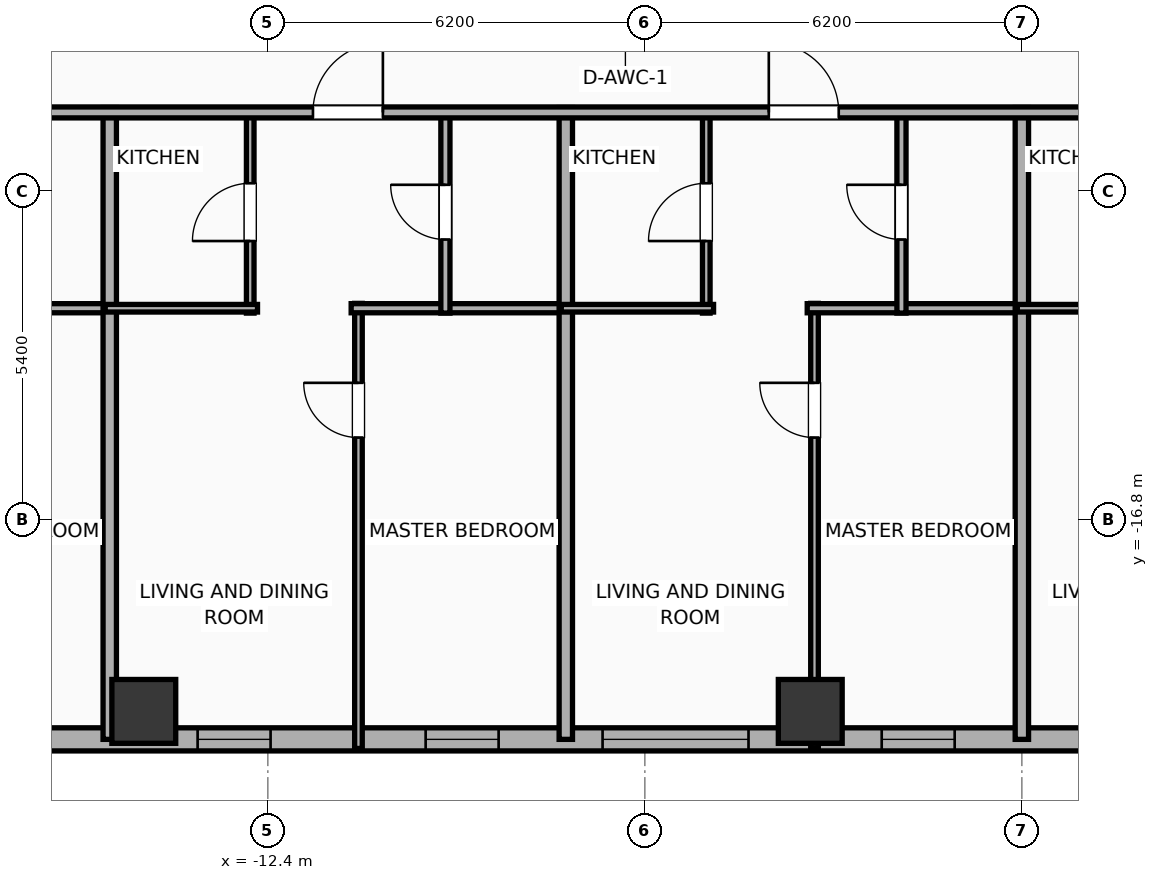
"""IFC4 building model, lengths in metres.
Left out: names, types, materials, properties, quantities, classifications, styles, units other than length and angle.
Written with IfcOpenShell. Run it as: python <this file> out.ifc"""

import sys

from ifc_helpers import new_model, si_unit, direction, frame, frame_2d, origin, origin_2d, place, context, subcontext, project, spatial, rectangle, hollow_rectangle, extrude, element, fill, save


model = new_model("IFC4")
c1 = context("Model", 3, precision=1e-05, world=origin(), true_north=direction((0.0, 1.0)))
c2 = subcontext(c1, "Body", "Model", "MODEL_VIEW")
j1 = project(units=[si_unit("LENGTHUNIT", "METRE"), si_unit("PLANEANGLEUNIT", "RADIAN")], contexts=[c1])
p1 = place(None, origin())
s1 = spatial("IfcSite", under=j1, at=p1, CompositionType="ELEMENT")
p2 = place(p1, origin())
s2 = spatial("IfcBuilding", under=s1, at=p2, CompositionType="ELEMENT")
p3 = place(p2, frame((0.0, 0.0, 136.5)))
s3 = spatial("IfcBuildingStorey", under=s2, at=p3, CompositionType="ELEMENT", Elevation=136.5)
for number, where, z_axis, x_axis in (
    (1, (-14.44, -19.95, 0.0), (0.0, 0.0, 1.0), (1.0, 0.0, 0.0)),
    (2, (-3.48, -19.95, 0.0), (0.0, 0.0, 1.0), (1.0, 0.0, 0.0)),
):
    element("IfcColumn", number, at=place(p3, frame(where, z_axis=z_axis, x_axis=x_axis)), inside=s3, PredefinedType="COLUMN", context=c2, shape_type="SweptSolid", body=[
        extrude(hollow_rectangle(XDim=1.05, YDim=1.05, WallThickness=0.036, at=origin_2d()), origin(), (0.0, 0.0, 1.0), 3.865),
    ])
p4 = place(p3, frame((29.381, -20.41, 0.0), z_axis=(0.0, 0.0, 1.0), x_axis=(-1.0, 0.0, 0.0)))
e3 = element("IfcWall", 3, at=p4, inside=s3, PredefinedType="ELEMENTEDWALL", context=c2, shape_type="SweptSolid", body=[
    extrude(rectangle(XDim=54.763, YDim=0.38, at=frame_2d((27.381, 0.0))), origin(), (0.0, 0.0, 1.0), 2.39),
])
p5 = place(p4, frame((7.295, 0.0, 0.75)))
e4 = element("IfcOpeningElement", 4, at=p5, cuts=e3, PredefinedType="OPENING", context=c2, shape_type="SweptSolid", body=[
    extrude(rectangle(XDim=2.4, YDim=1.45, at=frame_2d((1.2, 0.725))), frame((0.0, 0.2, 0.0), z_axis=(0.0, -1.0, 0.0), x_axis=(1.0, 0.0, 0.0)), (0.0, 0.0, 1.0), 0.4),
])
p6 = place(p4, frame((18.486, 0.0, 0.75)))
e5 = element("IfcOpeningElement", 5, at=p6, cuts=e3, PredefinedType="OPENING", context=c2, shape_type="SweptSolid", body=[
    extrude(rectangle(XDim=2.4, YDim=1.45, at=frame_2d((1.2, 0.725))), frame((0.0, 0.2, 0.0), z_axis=(0.0, -1.0, 0.0), x_axis=(1.0, 0.0, 0.0)), (0.0, 0.0, 1.0), 0.4),
])
p7 = place(p4, frame((33.877, 0.0, 0.75)))
e6 = element("IfcOpeningElement", 6, at=p7, cuts=e3, PredefinedType="OPENING", context=c2, shape_type="SweptSolid", body=[
    extrude(rectangle(XDim=2.4, YDim=1.45, at=frame_2d((1.2, 0.725))), frame((0.0, 0.2, 0.0), z_axis=(0.0, -1.0, 0.0), x_axis=(1.0, 0.0, 0.0)), (0.0, 0.0, 1.0), 0.4),
])
p8 = place(p4, frame((48.367, 0.0, 0.75)))
e7 = element("IfcOpeningElement", 7, at=p8, cuts=e3, PredefinedType="OPENING", context=c2, shape_type="SweptSolid", body=[
    extrude(rectangle(XDim=2.4, YDim=1.45, at=frame_2d((1.2, 0.725))), frame((0.0, 0.2, 0.0), z_axis=(0.0, -1.0, 0.0), x_axis=(1.0, 0.0, 0.0)), (0.0, 0.0, 1.0), 0.4),
])
p9 = place(p4, frame((52.277, 0.0, 0.55)))
e8 = element("IfcOpeningElement", 8, at=p9, cuts=e3, PredefinedType="OPENING", context=c2, shape_type="SweptSolid", body=[
    extrude(rectangle(XDim=1.2, YDim=1.15, at=frame_2d((0.6, 0.575))), frame((0.0, 0.2, 0.0), z_axis=(0.0, -1.0, 0.0), x_axis=(1.0, 0.0, 0.0)), (0.0, 0.0, 1.0), 0.4),
])
p10 = place(p4, frame((45.486, 0.0, 0.55)))
e9 = element("IfcOpeningElement", 9, at=p10, cuts=e3, PredefinedType="OPENING", context=c2, shape_type="SweptSolid", body=[
    extrude(rectangle(XDim=1.2, YDim=1.15, at=frame_2d((0.6, 0.575))), frame((0.0, 0.2, 0.0), z_axis=(0.0, -1.0, 0.0), x_axis=(1.0, 0.0, 0.0)), (0.0, 0.0, 1.0), 0.4),
])
p11 = place(p4, frame((41.736, 0.0, 0.55)))
e10 = element("IfcOpeningElement", 10, at=p11, cuts=e3, PredefinedType="OPENING", context=c2, shape_type="SweptSolid", body=[
    extrude(rectangle(XDim=1.2, YDim=1.15, at=frame_2d((0.6, 0.575))), frame((0.0, 0.2, 0.0), z_axis=(0.0, -1.0, 0.0), x_axis=(1.0, 0.0, 0.0)), (0.0, 0.0, 1.0), 0.4),
])
p12 = place(p4, frame((37.986, 0.0, 0.55)))
e11 = element("IfcOpeningElement", 11, at=p12, cuts=e3, PredefinedType="OPENING", context=c2, shape_type="SweptSolid", body=[
    extrude(rectangle(XDim=1.2, YDim=1.15, at=frame_2d((0.6, 0.575))), frame((0.0, 0.2, 0.0), z_axis=(0.0, -1.0, 0.0), x_axis=(1.0, 0.0, 0.0)), (0.0, 0.0, 1.0), 0.4),
])
p13 = place(p4, frame((30.486, 0.0, 0.55)))
e12 = element("IfcOpeningElement", 12, at=p13, cuts=e3, PredefinedType="OPENING", context=c2, shape_type="SweptSolid", body=[
    extrude(rectangle(XDim=1.2, YDim=1.15, at=frame_2d((0.6, 0.575))), frame((0.0, 0.2, 0.0), z_axis=(0.0, -1.0, 0.0), x_axis=(1.0, 0.0, 0.0)), (0.0, 0.0, 1.0), 0.4),
])
p14 = place(p4, frame((26.736, 0.0, 0.55)))
e13 = element("IfcOpeningElement", 13, at=p14, cuts=e3, PredefinedType="OPENING", context=c2, shape_type="SweptSolid", body=[
    extrude(rectangle(XDim=1.2, YDim=1.15, at=frame_2d((0.6, 0.575))), frame((0.0, 0.2, 0.0), z_axis=(0.0, -1.0, 0.0), x_axis=(1.0, 0.0, 0.0)), (0.0, 0.0, 1.0), 0.4),
])
p15 = place(p4, frame((22.986, 0.0, 0.55)))
e14 = element("IfcOpeningElement", 14, at=p15, cuts=e3, PredefinedType="OPENING", context=c2, shape_type="SweptSolid", body=[
    extrude(rectangle(XDim=1.2, YDim=1.15, at=frame_2d((0.6, 0.575))), frame((0.0, 0.2, 0.0), z_axis=(0.0, -1.0, 0.0), x_axis=(1.0, 0.0, 0.0)), (0.0, 0.0, 1.0), 0.4),
])
p16 = place(p4, frame((15.486, 0.0, 0.55)))
e15 = element("IfcOpeningElement", 15, at=p16, cuts=e3, PredefinedType="OPENING", context=c2, shape_type="SweptSolid", body=[
    extrude(rectangle(XDim=1.2, YDim=1.15, at=frame_2d((0.6, 0.575))), frame((0.0, 0.2, 0.0), z_axis=(0.0, -1.0, 0.0), x_axis=(1.0, 0.0, 0.0)), (0.0, 0.0, 1.0), 0.4),
])
p17 = place(p4, frame((11.736, 0.0, 0.55)))
e16 = element("IfcOpeningElement", 16, at=p17, cuts=e3, PredefinedType="OPENING", context=c2, shape_type="SweptSolid", body=[
    extrude(rectangle(XDim=1.2, YDim=1.15, at=frame_2d((0.6, 0.575))), frame((0.0, 0.2, 0.0), z_axis=(0.0, -1.0, 0.0), x_axis=(1.0, 0.0, 0.0)), (0.0, 0.0, 1.0), 0.4),
])
p18 = place(p4, frame((3.286, 0.0, 0.55)))
e17 = element("IfcOpeningElement", 17, at=p18, cuts=e3, PredefinedType="OPENING", context=c2, shape_type="SweptSolid", body=[
    extrude(rectangle(XDim=1.2, YDim=1.15, at=frame_2d((0.6, 0.575))), frame((0.0, 0.2, 0.0), z_axis=(0.0, -1.0, 0.0), x_axis=(1.0, 0.0, 0.0)), (0.0, 0.0, 1.0), 0.4),
])
p19 = place(p3, frame((-18.53, -13.32, 0.0), z_axis=(0.0, 0.0, 1.0), x_axis=(1.0, 0.0, 0.0)))
e18 = element("IfcWall", 18, at=p19, inside=s3, PredefinedType="PLUMBINGWALL", context=c2, shape_type="SweptSolid", body=[
    extrude(rectangle(XDim=3.605, YDim=0.15, at=frame_2d((1.802, 0.0))), origin(), (0.0, 0.0, 1.0), 3.5),
])
p20 = place(p3, frame((-15.0, -20.41, 0.0), z_axis=(0.0, 0.0, 1.0), x_axis=(0.0, 1.0, 0.0)))
e19 = element("IfcWall", 19, at=p20, inside=s3, PredefinedType="PARTITIONING", context=c2, shape_type="SweptSolid", body=[
    extrude(rectangle(XDim=10.39, YDim=0.22, at=frame_2d((5.195, 0.0))), origin(), (0.0, 0.0, 1.0), 2.39),
])
p21 = place(p3, frame((-10.91, -20.56, 0.0), z_axis=(0.0, 0.0, 1.0), x_axis=(0.0, 1.0, 0.0)))
e20 = element("IfcWall", 20, at=p21, inside=s3, PredefinedType="PARTITIONING", context=c2, shape_type="SweptSolid", body=[
    extrude(rectangle(XDim=7.32, YDim=0.125, at=frame_2d((3.66, 0.0))), origin(), (0.0, 0.0, 1.0), 3.5),
])
p22 = place(p21, frame((5.113, 0.0, 0.0)))
e21 = element("IfcOpeningElement", 21, at=p22, cuts=e20, PredefinedType="OPENING", context=c2, shape_type="SweptSolid", body=[
    extrude(rectangle(XDim=0.9, YDim=2.05, at=frame_2d((0.45, 1.025))), frame((0.0, 0.073, 0.0), z_axis=(0.0, -1.0, 0.0), x_axis=(1.0, 0.0, 0.0)), (0.0, 0.0, 1.0), 0.145),
])
p23 = place(p3, frame((-11.03, -13.32, 0.0), z_axis=(0.0, 0.0, 1.0), x_axis=(1.0, 0.0, 0.0)))
e22 = element("IfcWall", 22, at=p23, inside=s3, PredefinedType="PLUMBINGWALL", context=c2, shape_type="SweptSolid", body=[
    extrude(rectangle(XDim=3.605, YDim=0.15, at=frame_2d((1.802, 0.0))), origin(), (0.0, 0.0, 1.0), 3.5),
])
p24 = place(p3, frame((-12.69, -13.4, 0.0), z_axis=(0.0, 0.0, 1.0), x_axis=(0.0, 1.0, 0.0)))
e23 = element("IfcWall", 23, at=p24, inside=s3, PredefinedType="PARTITIONING", context=c2, shape_type="SweptSolid", body=[
    extrude(rectangle(XDim=3.32, YDim=0.125, at=frame_2d((1.66, 0.0))), origin(), (0.0, 0.0, 1.0), 3.5),
])
p25 = place(p24, frame((1.185, 0.0, 0.0)))
e24 = element("IfcOpeningElement", 24, at=p25, cuts=e23, PredefinedType="OPENING", context=c2, shape_type="SweptSolid", body=[
    extrude(rectangle(XDim=0.95, YDim=2.05, at=frame_2d((0.475, 1.025))), frame((0.0, 0.073, 0.0), z_axis=(0.0, -1.0, 0.0), x_axis=(1.0, 0.0, 0.0)), (0.0, 0.0, 1.0), 0.145),
])
p26 = place(p3, frame((-15.075, -13.32, 0.0), z_axis=(0.0, 0.0, 1.0), x_axis=(1.0, 0.0, 0.0)))
e25 = element("IfcWall", 25, at=p26, inside=s3, PredefinedType="PARTITIONING", context=c2, shape_type="SweptSolid", body=[
    extrude(rectangle(XDim=2.505, YDim=0.125, at=frame_2d((1.252, 0.0))), origin(), (0.0, 0.0, 1.0), 3.5),
])
p27 = place(p3, frame((-9.48, -13.4, 0.0), z_axis=(0.0, 0.0, 1.0), x_axis=(0.0, 1.0, 0.0)))
e26 = element("IfcWall", 26, at=p27, inside=s3, PredefinedType="PLUMBINGWALL", context=c2, shape_type="SweptSolid", body=[
    extrude(rectangle(XDim=3.32, YDim=0.15, at=frame_2d((1.66, 0.0))), origin(), (0.0, 0.0, 1.0), 3.5),
])
p28 = place(p27, frame((1.21, 0.0, 0.0)))
e27 = element("IfcOpeningElement", 27, at=p28, cuts=e26, PredefinedType="OPENING", context=c2, shape_type="SweptSolid", body=[
    extrude(rectangle(XDim=0.9, YDim=2.05, at=frame_2d((0.45, 1.025))), frame((0.0, 0.085, 0.0), z_axis=(0.0, -1.0, 0.0), x_axis=(1.0, 0.0, 0.0)), (0.0, 0.0, 1.0), 0.17),
])
p29 = place(p3, frame((-7.5, -20.41, 0.0), z_axis=(0.0, 0.0, 1.0), x_axis=(0.0, 1.0, 0.0)))
e28 = element("IfcWall", 28, at=p29, inside=s3, PredefinedType="PARTITIONING", context=c2, shape_type="SweptSolid", body=[
    extrude(rectangle(XDim=10.39, YDim=0.22, at=frame_2d((5.195, 0.0))), origin(), (0.0, 0.0, 1.0), 3.5),
])
p30 = place(p3, frame((-3.41, -20.56, 0.0), z_axis=(0.0, 0.0, 1.0), x_axis=(0.0, 1.0, 0.0)))
e29 = element("IfcWall", 29, at=p30, inside=s3, PredefinedType="PARTITIONING", context=c2, shape_type="SweptSolid", body=[
    extrude(rectangle(XDim=7.32, YDim=0.125, at=frame_2d((3.66, 0.0))), origin(), (0.0, 0.0, 1.0), 2.39),
])
p31 = place(p30, frame((5.113, 0.0, 0.0)))
e30 = element("IfcOpeningElement", 30, at=p31, cuts=e29, PredefinedType="OPENING", context=c2, shape_type="SweptSolid", body=[
    extrude(rectangle(XDim=0.9, YDim=2.05, at=frame_2d((0.45, 1.025))), frame((0.0, 0.073, 0.0), z_axis=(0.0, -1.0, 0.0), x_axis=(1.0, 0.0, 0.0)), (0.0, 0.0, 1.0), 0.145),
])
p32 = place(p3, frame((-3.53, -13.32, 0.0), z_axis=(0.0, 0.0, 1.0), x_axis=(1.0, 0.0, 0.0)))
e31 = element("IfcWall", 31, at=p32, inside=s3, PredefinedType="PLUMBINGWALL", context=c2, shape_type="SweptSolid", body=[
    extrude(rectangle(XDim=3.605, YDim=0.15, at=frame_2d((1.802, 0.0))), origin(), (0.0, 0.0, 1.0), 3.5),
])
p33 = place(p3, frame((-5.19, -13.4, 0.0), z_axis=(0.0, 0.0, 1.0), x_axis=(0.0, 1.0, 0.0)))
e32 = element("IfcWall", 32, at=p33, inside=s3, PredefinedType="PARTITIONING", context=c2, shape_type="SweptSolid", body=[
    extrude(rectangle(XDim=3.32, YDim=0.125, at=frame_2d((1.66, 0.0))), origin(), (0.0, 0.0, 1.0), 3.5),
])
p34 = place(p33, frame((1.185, 0.0, 0.0)))
e33 = element("IfcOpeningElement", 33, at=p34, cuts=e32, PredefinedType="OPENING", context=c2, shape_type="SweptSolid", body=[
    extrude(rectangle(XDim=0.95, YDim=2.05, at=frame_2d((0.475, 1.025))), frame((0.0, 0.073, 0.0), z_axis=(0.0, -1.0, 0.0), x_axis=(1.0, 0.0, 0.0)), (0.0, 0.0, 1.0), 0.145),
])
p35 = place(p3, frame((-7.575, -13.32, 0.0), z_axis=(0.0, 0.0, 1.0), x_axis=(1.0, 0.0, 0.0)))
e34 = element("IfcWall", 34, at=p35, inside=s3, PredefinedType="PARTITIONING", context=c2, shape_type="SweptSolid", body=[
    extrude(rectangle(XDim=2.505, YDim=0.125, at=frame_2d((1.252, 0.0))), origin(), (0.0, 0.0, 1.0), 3.5),
])
p36 = place(p3, frame((-1.98, -13.4, 0.0), z_axis=(0.0, 0.0, 1.0), x_axis=(0.0, 1.0, 0.0)))
e35 = element("IfcWall", 35, at=p36, inside=s3, PredefinedType="PLUMBINGWALL", context=c2, shape_type="SweptSolid", body=[
    extrude(rectangle(XDim=3.32, YDim=0.15, at=frame_2d((1.66, 0.0))), origin(), (0.0, 0.0, 1.0), 3.5),
])
p37 = place(p36, frame((1.21, 0.0, 0.0)))
e36 = element("IfcOpeningElement", 36, at=p37, cuts=e35, PredefinedType="OPENING", context=c2, shape_type="SweptSolid", body=[
    extrude(rectangle(XDim=0.9, YDim=2.05, at=frame_2d((0.45, 1.025))), frame((0.0, 0.085, 0.0), z_axis=(0.0, -1.0, 0.0), x_axis=(1.0, 0.0, 0.0)), (0.0, 0.0, 1.0), 0.17),
])
p38 = place(p3, frame((0.0, -20.41, 0.0), z_axis=(0.0, 0.0, 1.0), x_axis=(0.0, 1.0, 0.0)))
e37 = element("IfcWall", 37, at=p38, inside=s3, PredefinedType="PARTITIONING", context=c2, shape_type="SweptSolid", body=[
    extrude(rectangle(XDim=10.39, YDim=0.22, at=frame_2d((5.195, 0.0))), origin(), (0.0, 0.0, 1.0), 3.5),
])
p39 = place(p3, frame((-0.075, -13.32, 0.0), z_axis=(0.0, 0.0, 1.0), x_axis=(1.0, 0.0, 0.0)))
e38 = element("IfcWall", 38, at=p39, inside=s3, PredefinedType="PARTITIONING", context=c2, shape_type="SweptSolid", body=[
    extrude(rectangle(XDim=2.505, YDim=0.125, at=frame_2d((1.252, 0.0))), origin(), (0.0, 0.0, 1.0), 3.5),
])
p40 = place(p3, frame((-29.21, -10.1, 0.0), z_axis=(0.0, 0.0, 1.0), x_axis=(1.0, 0.0, 0.0)))
e39 = element("IfcWall", 39, at=p40, inside=s3, PredefinedType="PARTITIONING", context=c2, shape_type="SweptSolid", body=[
    extrude(rectangle(XDim=62.42, YDim=0.18, at=frame_2d((31.21, 0.0))), origin(), (0.0, 0.0, 1.0), 2.39),
])
p41 = place(p40, frame((3.002, 0.0, 0.0)))
e40 = element("IfcOpeningElement", 40, at=p41, cuts=e39, PredefinedType="OPENING", context=c2, shape_type="SweptSolid", body=[
    extrude(rectangle(XDim=0.9, YDim=2.05, at=frame_2d((0.45, 1.025))), frame((0.0, 0.1, 0.0), z_axis=(0.0, -1.0, 0.0), x_axis=(1.0, 0.0, 0.0)), (0.0, 0.0, 1.0), 0.2),
])
p42 = place(p40, frame((10.049, 0.0, 0.0)))
e41 = element("IfcOpeningElement", 41, at=p42, cuts=e39, PredefinedType="OPENING", context=c2, shape_type="SweptSolid", body=[
    extrude(rectangle(XDim=1.15, YDim=2.05, at=frame_2d((0.575, 1.025))), frame((0.0, 0.1, 0.0), z_axis=(0.0, -1.0, 0.0), x_axis=(1.0, 0.0, 0.0)), (0.0, 0.0, 1.0), 0.2),
])
p43 = place(p40, frame((17.552, 0.0, 0.0)))
e42 = element("IfcOpeningElement", 42, at=p43, cuts=e39, PredefinedType="OPENING", context=c2, shape_type="SweptSolid", body=[
    extrude(rectangle(XDim=1.15, YDim=2.05, at=frame_2d((0.575, 1.025))), frame((0.0, 0.1, 0.0), z_axis=(0.0, -1.0, 0.0), x_axis=(1.0, 0.0, 0.0)), (0.0, 0.0, 1.0), 0.2),
])
p44 = place(p40, frame((25.048, 0.0, 0.0)))
e43 = element("IfcOpeningElement", 43, at=p44, cuts=e39, PredefinedType="OPENING", context=c2, shape_type="SweptSolid", body=[
    extrude(rectangle(XDim=1.15, YDim=2.05, at=frame_2d((0.575, 1.025))), frame((0.0, 0.1, 0.0), z_axis=(0.0, -1.0, 0.0), x_axis=(1.0, 0.0, 0.0)), (0.0, 0.0, 1.0), 0.2),
])
p45 = place(p40, frame((32.551, 0.0, 0.0)))
e44 = element("IfcOpeningElement", 44, at=p45, cuts=e39, PredefinedType="OPENING", context=c2, shape_type="SweptSolid", body=[
    extrude(rectangle(XDim=1.15, YDim=2.05, at=frame_2d((0.575, 1.025))), frame((0.0, 0.1, 0.0), z_axis=(0.0, -1.0, 0.0), x_axis=(1.0, 0.0, 0.0)), (0.0, 0.0, 1.0), 0.2),
])
p46 = place(p40, frame((40.048, 0.0, 0.0)))
e45 = element("IfcOpeningElement", 45, at=p46, cuts=e39, PredefinedType="OPENING", context=c2, shape_type="SweptSolid", body=[
    extrude(rectangle(XDim=1.15, YDim=2.05, at=frame_2d((0.575, 1.025))), frame((0.0, 0.1, 0.0), z_axis=(0.0, -1.0, 0.0), x_axis=(1.0, 0.0, 0.0)), (0.0, 0.0, 1.0), 0.2),
])
p47 = place(p40, frame((47.551, 0.0, 0.0)))
e46 = element("IfcOpeningElement", 46, at=p47, cuts=e39, PredefinedType="OPENING", context=c2, shape_type="SweptSolid", body=[
    extrude(rectangle(XDim=1.15, YDim=2.05, at=frame_2d((0.575, 1.025))), frame((0.0, 0.1, 0.0), z_axis=(0.0, -1.0, 0.0), x_axis=(1.0, 0.0, 0.0)), (0.0, 0.0, 1.0), 0.2),
])
p48 = place(p40, frame((57.064, 0.0, 0.0)))
e47 = element("IfcOpeningElement", 47, at=p48, cuts=e39, PredefinedType="OPENING", context=c2, shape_type="SweptSolid", body=[
    extrude(rectangle(XDim=1.15, YDim=2.05, at=frame_2d((0.575, 1.025))), frame((0.0, 0.1, 0.0), z_axis=(0.0, -1.0, 0.0), x_axis=(1.0, 0.0, 0.0)), (0.0, 0.0, 1.0), 0.2),
])
p49 = place(p7, origin())
e48 = element("IfcWindow", 48, at=p49, inside=s3, PartitioningType="SINGLE_PANEL", PredefinedType="WINDOW", context=c2, shape_type="SweptSolid", body=[
    extrude(rectangle(XDim=2.4, YDim=1.45, at=frame_2d((1.2, 0.725))), frame((0.0, 0.03, 0.0), z_axis=(0.0, -1.0, 0.0), x_axis=(1.0, 0.0, 0.0)), (0.0, 0.0, 1.0), 0.06),
])
fill(e6, e48)
p50 = place(p11, origin())
e49 = element("IfcWindow", 49, at=p50, inside=s3, PartitioningType="SINGLE_PANEL", PredefinedType="WINDOW", context=c2, shape_type="SweptSolid", body=[
    extrude(rectangle(XDim=1.2, YDim=1.15, at=frame_2d((0.6, 0.575))), frame((0.0, 0.03, 0.0), z_axis=(0.0, -1.0, 0.0), x_axis=(1.0, 0.0, 0.0)), (0.0, 0.0, 1.0), 0.06),
])
fill(e10, e49)
p51 = place(p12, origin())
e50 = element("IfcWindow", 50, at=p51, inside=s3, PartitioningType="SINGLE_PANEL", PredefinedType="WINDOW", context=c2, shape_type="SweptSolid", body=[
    extrude(rectangle(XDim=1.2, YDim=1.15, at=frame_2d((0.6, 0.575))), frame((0.0, 0.03, 0.0), z_axis=(0.0, -1.0, 0.0), x_axis=(1.0, 0.0, 0.0)), (0.0, 0.0, 1.0), 0.06),
])
fill(e11, e50)
p52 = place(p13, origin())
e51 = element("IfcWindow", 51, at=p52, inside=s3, PartitioningType="SINGLE_PANEL", PredefinedType="WINDOW", context=c2, shape_type="SweptSolid", body=[
    extrude(rectangle(XDim=1.2, YDim=1.15, at=frame_2d((0.6, 0.575))), frame((0.0, 0.03, 0.0), z_axis=(0.0, -1.0, 0.0), x_axis=(1.0, 0.0, 0.0)), (0.0, 0.0, 1.0), 0.06),
])
fill(e12, e51)
p53 = place(p22, origin())
e52 = element("IfcDoor", 52, at=p53, inside=s3, OperationType="SINGLE_SWING_RIGHT", PredefinedType="DOOR", context=c2, shape_type="SweptSolid", body=[
    extrude(rectangle(XDim=0.9, YDim=2.05, at=frame_2d((0.45, 1.025))), frame((0.0, 0.025, 0.0), z_axis=(0.0, -1.0, 0.0), x_axis=(1.0, 0.0, 0.0)), (0.0, 0.0, 1.0), 0.05),
])
fill(e21, e52)
p54 = place(p25, origin())
e53 = element("IfcDoor", 53, at=p54, inside=s3, OperationType="SINGLE_SWING_LEFT", PredefinedType="DOOR", context=c2, shape_type="SweptSolid", body=[
    extrude(rectangle(XDim=0.95, YDim=2.05, at=frame_2d((0.475, 1.025))), frame((0.0, 0.025, 0.0), z_axis=(0.0, -1.0, 0.0), x_axis=(1.0, 0.0, 0.0)), (0.0, 0.0, 1.0), 0.05),
])
fill(e24, e53)
p55 = place(p28, origin())
e54 = element("IfcDoor", 54, at=p55, inside=s3, OperationType="SINGLE_SWING_RIGHT", PredefinedType="DOOR", context=c2, shape_type="SweptSolid", body=[
    extrude(rectangle(XDim=0.9, YDim=2.05, at=frame_2d((0.45, 1.025))), frame((0.0, 0.025, 0.0), z_axis=(0.0, -1.0, 0.0), x_axis=(1.0, 0.0, 0.0)), (0.0, 0.0, 1.0), 0.05),
])
fill(e27, e54)
p56 = place(p31, origin())
e55 = element("IfcDoor", 55, at=p56, inside=s3, OperationType="SINGLE_SWING_RIGHT", PredefinedType="DOOR", context=c2, shape_type="SweptSolid", body=[
    extrude(rectangle(XDim=0.9, YDim=2.05, at=frame_2d((0.45, 1.025))), frame((0.0, 0.025, 0.0), z_axis=(0.0, -1.0, 0.0), x_axis=(1.0, 0.0, 0.0)), (0.0, 0.0, 1.0), 0.05),
])
fill(e30, e55)
p57 = place(p34, origin())
e56 = element("IfcDoor", 56, at=p57, inside=s3, OperationType="SINGLE_SWING_LEFT", PredefinedType="DOOR", context=c2, shape_type="SweptSolid", body=[
    extrude(rectangle(XDim=0.95, YDim=2.05, at=frame_2d((0.475, 1.025))), frame((0.0, 0.025, 0.0), z_axis=(0.0, -1.0, 0.0), x_axis=(1.0, 0.0, 0.0)), (0.0, 0.0, 1.0), 0.05),
])
fill(e33, e56)
p58 = place(p37, origin())
e57 = element("IfcDoor", 57, at=p58, inside=s3, OperationType="SINGLE_SWING_RIGHT", PredefinedType="DOOR", context=c2, shape_type="SweptSolid", body=[
    extrude(rectangle(XDim=0.9, YDim=2.05, at=frame_2d((0.45, 1.025))), frame((0.0, 0.025, 0.0), z_axis=(0.0, -1.0, 0.0), x_axis=(1.0, 0.0, 0.0)), (0.0, 0.0, 1.0), 0.05),
])
fill(e36, e57)
p59 = place(p43, origin())
e58 = element("IfcDoor", 58, at=p59, inside=s3, OperationType="SINGLE_SWING_RIGHT", PredefinedType="DOOR", context=c2, shape_type="SweptSolid", body=[
    extrude(rectangle(XDim=1.15, YDim=2.05, at=frame_2d((0.575, 1.025))), frame((0.0, 0.025, 0.0), z_axis=(0.0, -1.0, 0.0), x_axis=(1.0, 0.0, 0.0)), (0.0, 0.0, 1.0), 0.05),
])
fill(e42, e58)
p60 = place(p44, origin())
e59 = element("IfcDoor", 59, at=p60, inside=s3, OperationType="SINGLE_SWING_LEFT", PredefinedType="DOOR", context=c2, shape_type="SweptSolid", body=[
    extrude(rectangle(XDim=1.15, YDim=2.05, at=frame_2d((0.575, 1.025))), frame((0.0, 0.025, 0.0), z_axis=(0.0, -1.0, 0.0), x_axis=(1.0, 0.0, 0.0)), (0.0, 0.0, 1.0), 0.05),
])
fill(e43, e59)
save(model, sys.argv[1])
